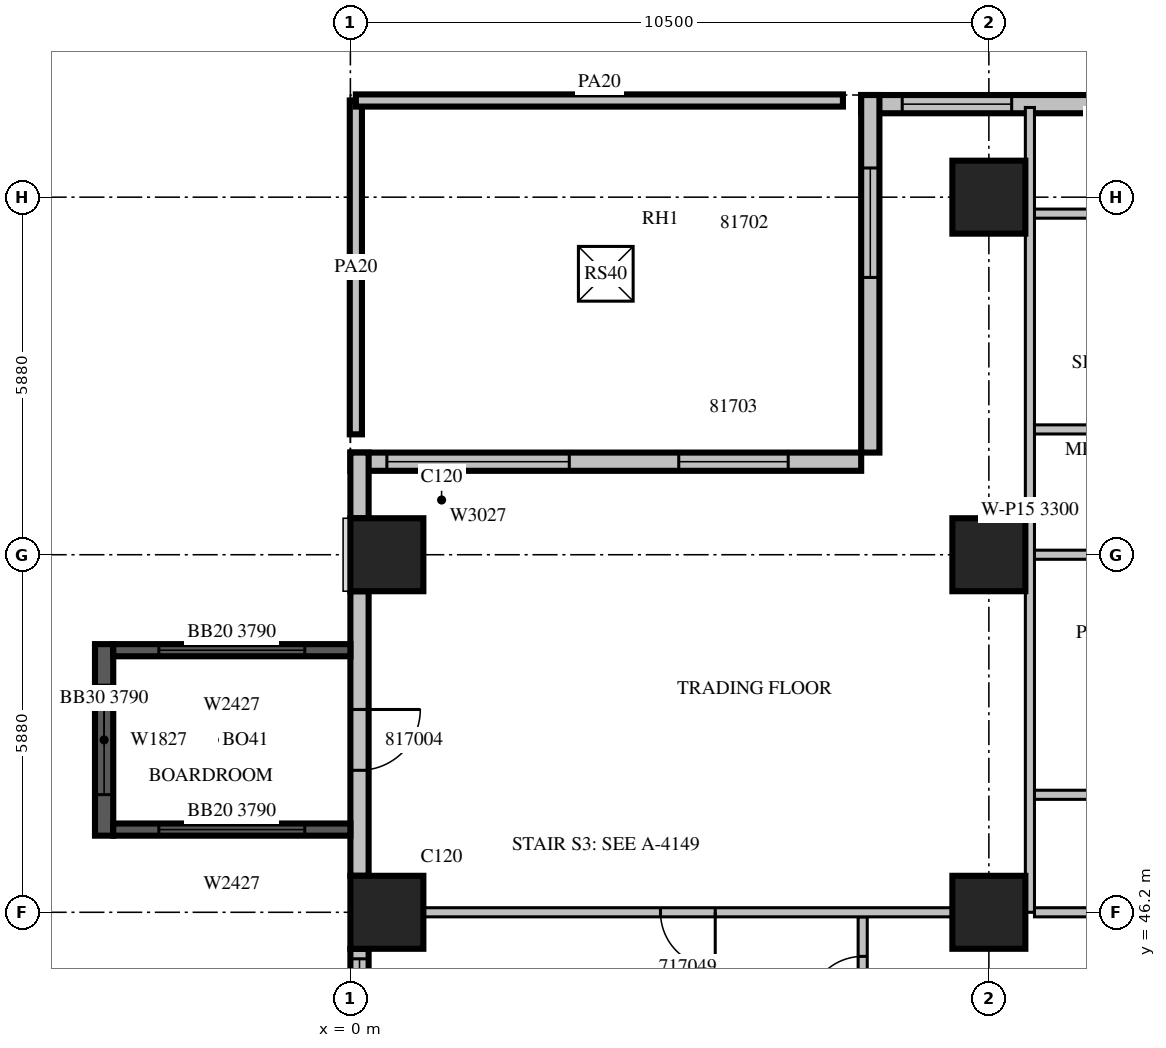
"""IFC4 building model, lengths in metres.
Left out: names, types, materials, properties, quantities, classifications, styles, units other than length and angle.
Written with IfcOpenShell. Run it as: python <this file> out.ifc"""

import sys

from ifc_helpers import new_model, si_unit, direction, frame, frame_2d, origin, origin_2d, place, context, subcontext, project, spatial, rectangle, extrude, source, transform, mapped, element, fill, save


model = new_model("IFC4")
c1 = context("Model", 3, precision=1e-05, world=origin(), true_north=direction((0.0, 1.0)))
c2 = subcontext(c1, "Body", "Model", "MODEL_VIEW")
j1 = project(units=[si_unit("LENGTHUNIT", "METRE"), si_unit("PLANEANGLEUNIT", "RADIAN")], contexts=[c1])
p1 = place(None, origin())
s1 = spatial("IfcSite", under=j1, at=p1, CompositionType="ELEMENT")
p2 = place(p1, origin())
s2 = spatial("IfcBuilding", under=s1, at=p2, CompositionType="ELEMENT")
p3 = place(p2, frame((0.0, 0.0, 82.5)))
s3 = spatial("IfcBuildingStorey", under=s2, at=p3, CompositionType="ELEMENT", Elevation=82.5)
m1 = source(origin(), c2, "Body", "SweptSolid", [
    extrude(rectangle(XDim=1.2, YDim=1.2, at=origin_2d()), origin(), (0.0, 0.0, 1.0), 4.2),
])
for number, where, z_axis, x_axis in (
    (1, (0.6, 46.2, 0.0), (0.0, 0.0, 1.0), (1.0, 0.0, 0.0)),
    (2, (10.5, 46.2, 0.0), (0.0, 0.0, 1.0), (1.0, 0.0, 0.0)),
    (3, (0.6, 52.08, 0.0), (0.0, 0.0, 1.0), (1.0, 0.0, 0.0)),
    (4, (10.5, 52.08, 0.0), (0.0, 0.0, 1.0), (1.0, 0.0, 0.0)),
    (5, (10.5, 57.96, 0.0), (0.0, 0.0, 1.0), (1.0, 0.0, 0.0)),
):
    element("IfcColumn", number, at=place(p3, frame(where, z_axis=z_axis, x_axis=x_axis)), inside=s3, PredefinedType="COLUMN", context=c2, shape_type="MappedRepresentation", body=[
        mapped(m1, transform((0.0, 0.0, 0.0), scale=1.0)),
    ])
m2 = source(origin(), c2, "Body", "SweptSolid", [
    extrude(rectangle(XDim=8.4, YDim=0.3, at=frame_2d((4.2, 0.0))), origin(), (0.0, 0.0, 1.0), 3.8),
])
p4 = place(p3, frame((16.8, 59.49, 0.0), z_axis=(0.0, 0.0, 1.0), x_axis=(-1.0, 0.0, 0.0)))
e6 = element("IfcWall", 6, at=p4, inside=s3, PredefinedType="STANDARD", context=c2, shape_type="MappedRepresentation", body=[
    mapped(m2, transform((0.0, 0.0, 0.0), scale=1.0)),
])
m3 = source(origin(), c2, "Body", "SweptSolid", [
    extrude(rectangle(XDim=1.8, YDim=2.7, at=frame_2d((0.9, 1.35))), frame((0.0, 0.16, 0.0), z_axis=(0.0, -1.0, 0.0), x_axis=(1.0, 0.0, 0.0)), (0.0, 0.0, 1.0), 0.32),
])
p5 = place(p4, frame((2.775, 0.0, 0.6)))
e7 = element("IfcOpeningElement", 7, at=p5, cuts=e6, PredefinedType="OPENING", context=c2, shape_type="MappedRepresentation", body=[
    mapped(m3, transform((0.0, 0.0, 0.0), scale=1.0)),
])
p6 = place(p4, frame((5.925, 0.0, 0.6)))
e8 = element("IfcOpeningElement", 8, at=p6, cuts=e6, PredefinedType="OPENING", context=c2, shape_type="MappedRepresentation", body=[
    mapped(m3, transform((0.0, 0.0, 0.0), scale=1.0)),
])
m4 = source(origin(), c2, "Body", "SweptSolid", [
    extrude(rectangle(XDim=5.88, YDim=0.3, at=frame_2d((2.94, 0.0))), origin(), (0.0, 0.0, 1.0), 3.8),
])
p7 = place(p3, frame((8.55, 59.64, 0.0), z_axis=(0.0, 0.0, 1.0), x_axis=(0.0, -1.0, 0.0)))
e9 = element("IfcWall", 9, at=p7, inside=s3, PredefinedType="STANDARD", context=c2, shape_type="MappedRepresentation", body=[
    mapped(m4, transform((0.0, 0.0, 0.0), scale=1.0)),
])
m5 = source(origin(), c2, "Body", "SweptSolid", [
    extrude(rectangle(XDim=1.8, YDim=2.4, at=frame_2d((0.9, 1.2))), frame((0.0, 0.16, 0.0), z_axis=(0.0, -1.0, 0.0), x_axis=(1.0, 0.0, 0.0)), (0.0, 0.0, 1.0), 0.32),
])
p8 = place(p7, frame((1.2, 0.0, 0.0)))
e10 = element("IfcOpeningElement", 10, at=p8, cuts=e9, PredefinedType="OPENING", context=c2, shape_type="MappedRepresentation", body=[
    mapped(m5, transform((0.0, 0.0, 0.0), scale=1.0)),
])
p9 = place(p3, frame((8.4, 53.61, 0.0), z_axis=(0.0, 0.0, 1.0), x_axis=(-1.0, 0.0, 0.0)))
e11 = element("IfcWall", 11, at=p9, inside=s3, PredefinedType="STANDARD", context=c2, shape_type="MappedRepresentation", body=[
    mapped(m2, transform((0.0, 0.0, 0.0), scale=1.0)),
])
p10 = place(p9, frame((1.2, 0.0, 0.0)))
e12 = element("IfcOpeningElement", 12, at=p10, cuts=e11, PredefinedType="OPENING", context=c2, shape_type="MappedRepresentation", body=[
    mapped(m5, transform((0.0, 0.0, 0.0), scale=1.0)),
])
m6 = source(origin(), c2, "Body", "SweptSolid", [
    extrude(rectangle(XDim=3.0, YDim=2.7, at=frame_2d((1.5, 1.35))), frame((0.0, 0.16, 0.0), z_axis=(0.0, -1.0, 0.0), x_axis=(1.0, 0.0, 0.0)), (0.0, 0.0, 1.0), 0.32),
])
p11 = place(p9, frame((4.8, 0.0, 0.6)))
e13 = element("IfcOpeningElement", 13, at=p11, cuts=e11, PredefinedType="OPENING", context=c2, shape_type="MappedRepresentation", body=[
    mapped(m6, transform((0.0, 0.0, 0.0), scale=1.0)),
])
m7 = source(origin(), c2, "Body", "SweptSolid", [
    extrude(rectangle(XDim=1.08, YDim=0.3, at=frame_2d((0.54, 0.0))), origin(), (0.0, 0.0, 1.0), 3.8),
])
p12 = place(p3, frame((0.15, 53.76, 0.0), z_axis=(0.0, 0.0, 1.0), x_axis=(0.0, -1.0, 0.0)))
e14 = element("IfcWall", 14, at=p12, inside=s3, PredefinedType="STANDARD", context=c2, shape_type="MappedRepresentation", body=[
    mapped(m7, transform((0.0, 0.0, 0.0), scale=1.0)),
])
m8 = source(origin(), c2, "Body", "SweptSolid", [
    extrude(rectangle(XDim=4.68, YDim=0.3, at=frame_2d((2.34, 0.0))), origin(), (0.0, 0.0, 1.0), 3.8),
])
p13 = place(p3, frame((0.15, 51.48, 0.0), z_axis=(0.0, 0.0, 1.0), x_axis=(0.0, -1.0, 0.0)))
e15 = element("IfcWall", 15, at=p13, inside=s3, PredefinedType="STANDARD", context=c2, shape_type="MappedRepresentation", body=[
    mapped(m8, transform((0.0, 0.0, 0.0), scale=1.0)),
])
m9 = source(origin(), c2, "Body", "SweptSolid", [
    extrude(rectangle(XDim=1.0, YDim=2.1, at=frame_2d((0.5, 1.05))), frame((0.0, 0.16, 0.0), z_axis=(0.0, -1.0, 0.0), x_axis=(1.0, 0.0, 0.0)), (0.0, 0.0, 1.0), 0.32),
])
p14 = place(p13, frame((1.945, 0.0, 0.0)))
e16 = element("IfcOpeningElement", 16, at=p14, cuts=e15, PredefinedType="OPENING", context=c2, shape_type="MappedRepresentation", body=[
    mapped(m9, transform((0.0, 0.0, 0.0), scale=1.0)),
])
m10 = source(origin(), c2, "Body", "SweptSolid", [
    extrude(rectangle(XDim=1.6, YDim=0.3, at=frame_2d((0.8, 0.0))), origin(), (0.0, 0.0, 1.0), 3.8),
])
p15 = place(p3, frame((0.15, 45.6, 0.0), z_axis=(0.0, 0.0, 1.0), x_axis=(0.0, -1.0, 0.0)))
e17 = element("IfcWall", 17, at=p15, inside=s3, PredefinedType="STANDARD", context=c2, shape_type="MappedRepresentation", body=[
    mapped(m10, transform((0.0, 0.0, 0.0), scale=1.0)),
])
m11 = source(origin(), c2, "Body", "SweptSolid", [
    extrude(rectangle(XDim=1.2, YDim=2.7, at=frame_2d((0.6, 1.35))), frame((0.0, 0.16, 0.0), z_axis=(0.0, -1.0, 0.0), x_axis=(1.0, 0.0, 0.0)), (0.0, 0.0, 1.0), 0.32),
])
p16 = place(p15, frame((0.165, 0.0, 0.6)))
e18 = element("IfcOpeningElement", 18, at=p16, cuts=e17, PredefinedType="OPENING", context=c2, shape_type="MappedRepresentation", body=[
    mapped(m11, transform((0.0, 0.0, 0.0), scale=1.0)),
])
p17 = place(p3, frame((-4.05, 50.61, 0.0), z_axis=(0.0, 0.0, 1.0), x_axis=(0.0, -1.0, 0.0)))
e19 = element("IfcWall", 19, at=p17, inside=s3, PredefinedType="SOLIDWALL", context=c2, shape_type="SweptSolid", body=[
    extrude(rectangle(XDim=3.15, YDim=0.3, at=frame_2d((1.575, 0.0))), origin(), (0.0, 0.0, 1.0), 3.79),
])
p18 = place(p17, frame((0.675, 0.0, 0.6)))
e20 = element("IfcOpeningElement", 20, at=p18, cuts=e19, PredefinedType="OPENING", context=c2, shape_type="MappedRepresentation", body=[
    mapped(m3, transform((0.0, 0.0, 0.0), scale=1.0)),
])
m12 = source(origin(), c2, "Body", "SweptSolid", [
    extrude(rectangle(XDim=3.9, YDim=0.2, at=frame_2d((1.95, 0.0))), origin(), (0.0, 0.0, 1.0), 3.79),
])
p19 = place(p3, frame((0.0, 50.51, 0.0), z_axis=(0.0, 0.0, 1.0), x_axis=(-1.0, 0.0, 0.0)))
e21 = element("IfcWall", 21, at=p19, inside=s3, PredefinedType="SOLIDWALL", context=c2, shape_type="MappedRepresentation", body=[
    mapped(m12, transform((0.0, 0.0, 0.0), scale=1.0)),
])
m13 = source(origin(), c2, "Body", "SweptSolid", [
    extrude(rectangle(XDim=2.4, YDim=2.7, at=frame_2d((1.2, 1.35))), frame((0.0, 0.11, 0.0), z_axis=(0.0, -1.0, 0.0), x_axis=(1.0, 0.0, 0.0)), (0.0, 0.0, 1.0), 0.22),
])
p20 = place(p19, frame((0.75, 0.0, 0.6)))
e22 = element("IfcOpeningElement", 22, at=p20, cuts=e21, PredefinedType="OPENING", context=c2, shape_type="MappedRepresentation", body=[
    mapped(m13, transform((0.0, 0.0, 0.0), scale=1.0)),
])
p21 = place(p3, frame((0.0, 47.56, 0.0), z_axis=(0.0, 0.0, 1.0), x_axis=(-1.0, 0.0, 0.0)))
e23 = element("IfcWall", 23, at=p21, inside=s3, PredefinedType="SOLIDWALL", context=c2, shape_type="MappedRepresentation", body=[
    mapped(m12, transform((0.0, 0.0, 0.0), scale=1.0)),
])
p22 = place(p21, frame((0.75, 0.0, 0.6)))
e24 = element("IfcOpeningElement", 24, at=p22, cuts=e23, PredefinedType="OPENING", context=c2, shape_type="MappedRepresentation", body=[
    mapped(m13, transform((0.0, 0.0, 0.0), scale=1.0)),
])
m14 = source(origin(), c2, "Body", "SweptSolid", [
    extrude(rectangle(XDim=5.49, YDim=0.2, at=frame_2d((2.745, 0.0))), origin(), (0.0, 0.0, 1.0), 1.1),
])
p23 = place(p3, frame((0.09, 54.06, 0.0), z_axis=(0.0, 0.0, 1.0), x_axis=(0.0, 1.0, 0.0)))
e25 = element("IfcWall", 25, at=p23, inside=s3, PredefinedType="PARAPET", context=c2, shape_type="MappedRepresentation", body=[
    mapped(m14, transform((0.0, 0.0, 0.0), scale=1.0)),
])
p24 = place(p3, frame((0.09, 59.55, 0.0), z_axis=(0.0, 0.0, 1.0), x_axis=(1.0, 0.0, 0.0)))
e26 = element("IfcWall", 26, at=p24, inside=s3, PredefinedType="PARAPET", context=c2, shape_type="SweptSolid", body=[
    extrude(rectangle(XDim=8.01, YDim=0.2, at=frame_2d((4.005, 0.0))), origin(), (0.0, 0.0, 1.0), 1.1),
])
m15 = source(origin(), c2, "Body", "SweptSolid", [
    extrude(rectangle(XDim=2.2, YDim=0.15, at=frame_2d((1.1, 0.0))), origin(), (0.0, 0.0, 1.0), 3.8),
])
p25 = place(p3, frame((8.425, 43.925, 0.0), z_axis=(0.0, 0.0, 1.0), x_axis=(0.0, 1.0, 0.0)))
e27 = element("IfcWall", 27, at=p25, inside=s3, PredefinedType="PARTITIONING", context=c2, shape_type="MappedRepresentation", body=[
    mapped(m15, transform((0.0, 0.0, 0.0), scale=1.0)),
])
m16 = source(origin(), c2, "Body", "SweptSolid", [
    extrude(rectangle(XDim=0.9, YDim=2.1, at=frame_2d((0.45, 1.05))), frame((0.0, 0.085, 0.0), z_axis=(0.0, -1.0, 0.0), x_axis=(1.0, 0.0, 0.0)), (0.0, 0.0, 1.0), 0.17),
])
p26 = place(p25, frame((0.65, 0.0, 0.0)))
e28 = element("IfcOpeningElement", 28, at=p26, cuts=e27, PredefinedType="OPENING", context=c2, shape_type="MappedRepresentation", body=[
    mapped(m16, transform((0.0, 0.0, 0.0), scale=1.0)),
])
m17 = source(origin(), c2, "Body", "SweptSolid", [
    extrude(rectangle(XDim=3.45, YDim=0.15, at=frame_2d((1.725, 0.0))), origin(), (0.0, 0.0, 1.0), 3.8),
])
for number, where, z_axis, x_axis in (
    (29, (14.7, 48.132, 0.0), (0.0, 0.0, 1.0), (-1.0, 0.0, 0.0)),
    (30, (14.7, 52.08, 0.0), (0.0, 0.0, 1.0), (-1.0, 0.0, 0.0)),
    (31, (14.7, 54.141, 0.0), (0.0, 0.0, 1.0), (-1.0, 0.0, 0.0)),
):
    element("IfcWall", number, at=place(p3, frame(where, z_axis=z_axis, x_axis=x_axis)), inside=s3, PredefinedType="PARTITIONING", context=c2, shape_type="MappedRepresentation", body=[
        mapped(m17, transform((0.0, 0.0, 0.0), scale=1.0)),
    ])
p27 = place(p3, frame((14.7, 57.689, 0.0), z_axis=(0.0, 0.0, 1.0), x_axis=(-1.0, 0.0, 0.0)))
e32 = element("IfcWall", 32, at=p27, inside=s3, PredefinedType="PARTITIONING", context=c2, shape_type="MappedRepresentation", body=[
    mapped(m17, transform((0.0, 0.0, 0.0), scale=1.0)),
])
p28 = place(p27, frame((1.275, 0.0, 0.0)))
e33 = element("IfcOpeningElement", 33, at=p28, cuts=e32, PredefinedType="OPENING", context=c2, shape_type="MappedRepresentation", body=[
    mapped(m16, transform((0.0, 0.0, 0.0), scale=1.0)),
])
m18 = source(origin(), c2, "Body", "SweptSolid", [
    extrude(rectangle(XDim=8.702, YDim=0.15, at=frame_2d((4.351, 0.0))), origin(), (0.0, 0.0, 1.0), 3.8),
])
p29 = place(p3, frame((9.901, 46.2, 0.0), z_axis=(0.0, 0.0, 1.0), x_axis=(-1.0, 0.0, 0.0)))
e34 = element("IfcWall", 34, at=p29, inside=s3, PredefinedType="PARTITIONING", context=c2, shape_type="MappedRepresentation", body=[
    mapped(m18, transform((0.0, 0.0, 0.0), scale=1.0)),
])
p30 = place(p29, frame((3.901, 0.0, 0.0)))
e35 = element("IfcOpeningElement", 35, at=p30, cuts=e34, PredefinedType="OPENING", context=c2, shape_type="MappedRepresentation", body=[
    mapped(m16, transform((0.0, 0.0, 0.0), scale=1.0)),
])
p31 = place(p3, frame((14.7, 46.2, 0.0), z_axis=(0.0, 0.0, 1.0), x_axis=(-1.0, 0.0, 0.0)))
e36 = element("IfcWall", 36, at=p31, inside=s3, PredefinedType="PARTITIONING", context=c2, shape_type="MappedRepresentation", body=[
    mapped(m17, transform((0.0, 0.0, 0.0), scale=1.0)),
])
p32 = place(p3, frame((11.175, 46.2, 0.0), z_axis=(0.0, 0.0, 1.0), x_axis=(0.0, 1.0, 0.0)))
e37 = element("IfcWall", 37, at=p32, inside=s3, PredefinedType="PARTITIONING", context=c2, shape_type="SweptSolid", body=[
    extrude(rectangle(XDim=13.235, YDim=0.15, at=frame_2d((6.617, 0.0))), origin(), (0.0, 0.0, 1.0), 3.3),
])
m19 = source(origin(), c2, "Body", "SweptSolid", [
    extrude(rectangle(XDim=1.8, YDim=2.7, at=frame_2d((0.9, 1.35))), frame((0.0, 0.03, 0.0), z_axis=(0.0, -1.0, 0.0), x_axis=(1.0, 0.0, 0.0)), (0.0, 0.0, 1.0), 0.06),
])
p33 = place(p6, origin())
e38 = element("IfcWindow", 38, at=p33, inside=s3, PartitioningType="SINGLE_PANEL", PredefinedType="WINDOW", context=c2, shape_type="MappedRepresentation", body=[
    mapped(m19, transform((0.0, 0.0, 0.0), scale=1.0)),
])
fill(e8, e38)
m20 = source(origin(), c2, "Body", "SweptSolid", [
    extrude(rectangle(XDim=1.8, YDim=2.4, at=frame_2d((0.9, 1.2))), frame((0.0, 0.025, 0.0), z_axis=(0.0, -1.0, 0.0), x_axis=(1.0, 0.0, 0.0)), (0.0, 0.0, 1.0), 0.05),
])
p34 = place(p8, origin())
e39 = element("IfcDoor", 39, at=p34, inside=s3, OperationType="SLIDING_TO_LEFT", PredefinedType="DOOR", context=c2, shape_type="MappedRepresentation", body=[
    mapped(m20, transform((0.0, 0.0, 0.0), scale=1.0)),
])
fill(e10, e39)
p35 = place(p10, origin())
e40 = element("IfcDoor", 40, at=p35, inside=s3, OperationType="SLIDING_TO_LEFT", PredefinedType="DOOR", context=c2, shape_type="MappedRepresentation", body=[
    mapped(m20, transform((0.0, 0.0, 0.0), scale=1.0)),
])
fill(e12, e40)
m21 = source(origin(), c2, "Body", "SweptSolid", [
    extrude(rectangle(XDim=3.0, YDim=2.7, at=frame_2d((1.5, 1.35))), frame((0.0, 0.03, 0.0), z_axis=(0.0, -1.0, 0.0), x_axis=(1.0, 0.0, 0.0)), (0.0, 0.0, 1.0), 0.06),
])
p36 = place(p11, origin())
e41 = element("IfcWindow", 41, at=p36, inside=s3, PartitioningType="SINGLE_PANEL", PredefinedType="WINDOW", context=c2, shape_type="MappedRepresentation", body=[
    mapped(m21, transform((0.0, 0.0, 0.0), scale=1.0)),
])
fill(e13, e41)
m22 = source(origin(), c2, "Body", "SweptSolid", [
    extrude(rectangle(XDim=1.2, YDim=2.7, at=frame_2d((0.6, 1.35))), frame((0.0, 0.03, 0.0), z_axis=(0.0, -1.0, 0.0), x_axis=(1.0, 0.0, 0.0)), (0.0, 0.0, 1.0), 0.06),
])
p37 = place(p16, origin())
e42 = element("IfcWindow", 42, at=p37, inside=s3, PartitioningType="SINGLE_PANEL", PredefinedType="WINDOW", context=c2, shape_type="MappedRepresentation", body=[
    mapped(m22, transform((0.0, 0.0, 0.0), scale=1.0)),
])
fill(e18, e42)
p38 = place(p18, origin())
e43 = element("IfcWindow", 43, at=p38, inside=s3, PartitioningType="SINGLE_PANEL", PredefinedType="WINDOW", context=c2, shape_type="MappedRepresentation", body=[
    mapped(m19, transform((0.0, 0.0, 0.0), scale=1.0)),
])
fill(e20, e43)
m23 = source(origin(), c2, "Body", "SweptSolid", [
    extrude(rectangle(XDim=2.4, YDim=2.7, at=frame_2d((1.2, 1.35))), frame((0.0, 0.03, 0.0), z_axis=(0.0, -1.0, 0.0), x_axis=(1.0, 0.0, 0.0)), (0.0, 0.0, 1.0), 0.06),
])
p39 = place(p20, origin())
e44 = element("IfcWindow", 44, at=p39, inside=s3, PartitioningType="SINGLE_PANEL", PredefinedType="WINDOW", context=c2, shape_type="MappedRepresentation", body=[
    mapped(m23, transform((0.0, 0.0, 0.0), scale=1.0)),
])
fill(e22, e44)
p40 = place(p22, origin())
e45 = element("IfcWindow", 45, at=p40, inside=s3, PartitioningType="SINGLE_PANEL", PredefinedType="WINDOW", context=c2, shape_type="MappedRepresentation", body=[
    mapped(m23, transform((0.0, 0.0, 0.0), scale=1.0)),
])
fill(e24, e45)
m24 = source(origin(), c2, "Body", "SweptSolid", [
    extrude(rectangle(XDim=0.9, YDim=0.9, at=origin_2d()), origin(), (0.0, 0.0, 1.0), 0.05),
])
p41 = place(p3, frame((0.0, 0.0, -0.4)))
p42 = place(p41, frame((4.2, 56.7, 0.0)))
p43 = place(p42, frame((0.0, 0.0, 0.35)))
e46 = element("IfcWindow", 46, at=p43, inside=s3, PartitioningType="SINGLE_PANEL", PredefinedType="SKYLIGHT", context=c2, shape_type="MappedRepresentation", body=[
    mapped(m24, transform((0.0, 0.0, 0.0), scale=1.0)),
])
m25 = source(origin(), c2, "Body", "SweptSolid", [
    extrude(rectangle(XDim=0.9, YDim=2.1, at=frame_2d((0.45, 1.05))), frame((0.0, 0.025, 0.0), z_axis=(0.0, -1.0, 0.0), x_axis=(1.0, 0.0, 0.0)), (0.0, 0.0, 1.0), 0.05),
])
p44 = place(p26, origin())
e47 = element("IfcDoor", 47, at=p44, inside=s3, OperationType="SINGLE_SWING_LEFT", PredefinedType="DOOR", context=c2, shape_type="MappedRepresentation", body=[
    mapped(m25, transform((0.0, 0.0, 0.0), scale=1.0)),
])
fill(e28, e47)
p45 = place(p30, origin())
e48 = element("IfcDoor", 48, at=p45, inside=s3, OperationType="SINGLE_SWING_LEFT", PredefinedType="DOOR", context=c2, shape_type="MappedRepresentation", body=[
    mapped(m25, transform((0.0, 0.0, 0.0), scale=1.0)),
])
fill(e35, e48)
m26 = source(origin(), c2, "Body", "SweptSolid", [
    extrude(rectangle(XDim=1.0, YDim=2.1, at=frame_2d((0.5, 1.05))), frame((0.0, 0.025, 0.0), z_axis=(0.0, -1.0, 0.0), x_axis=(1.0, 0.0, 0.0)), (0.0, 0.0, 1.0), 0.05),
])
p46 = place(p14, origin())
e49 = element("IfcDoor", 49, at=p46, inside=s3, OperationType="SINGLE_SWING_LEFT", PredefinedType="DOOR", context=c2, shape_type="MappedRepresentation", body=[
    mapped(m26, transform((0.0, 0.0, 0.0), scale=1.0)),
])
fill(e16, e49)
save(model, sys.argv[1])
